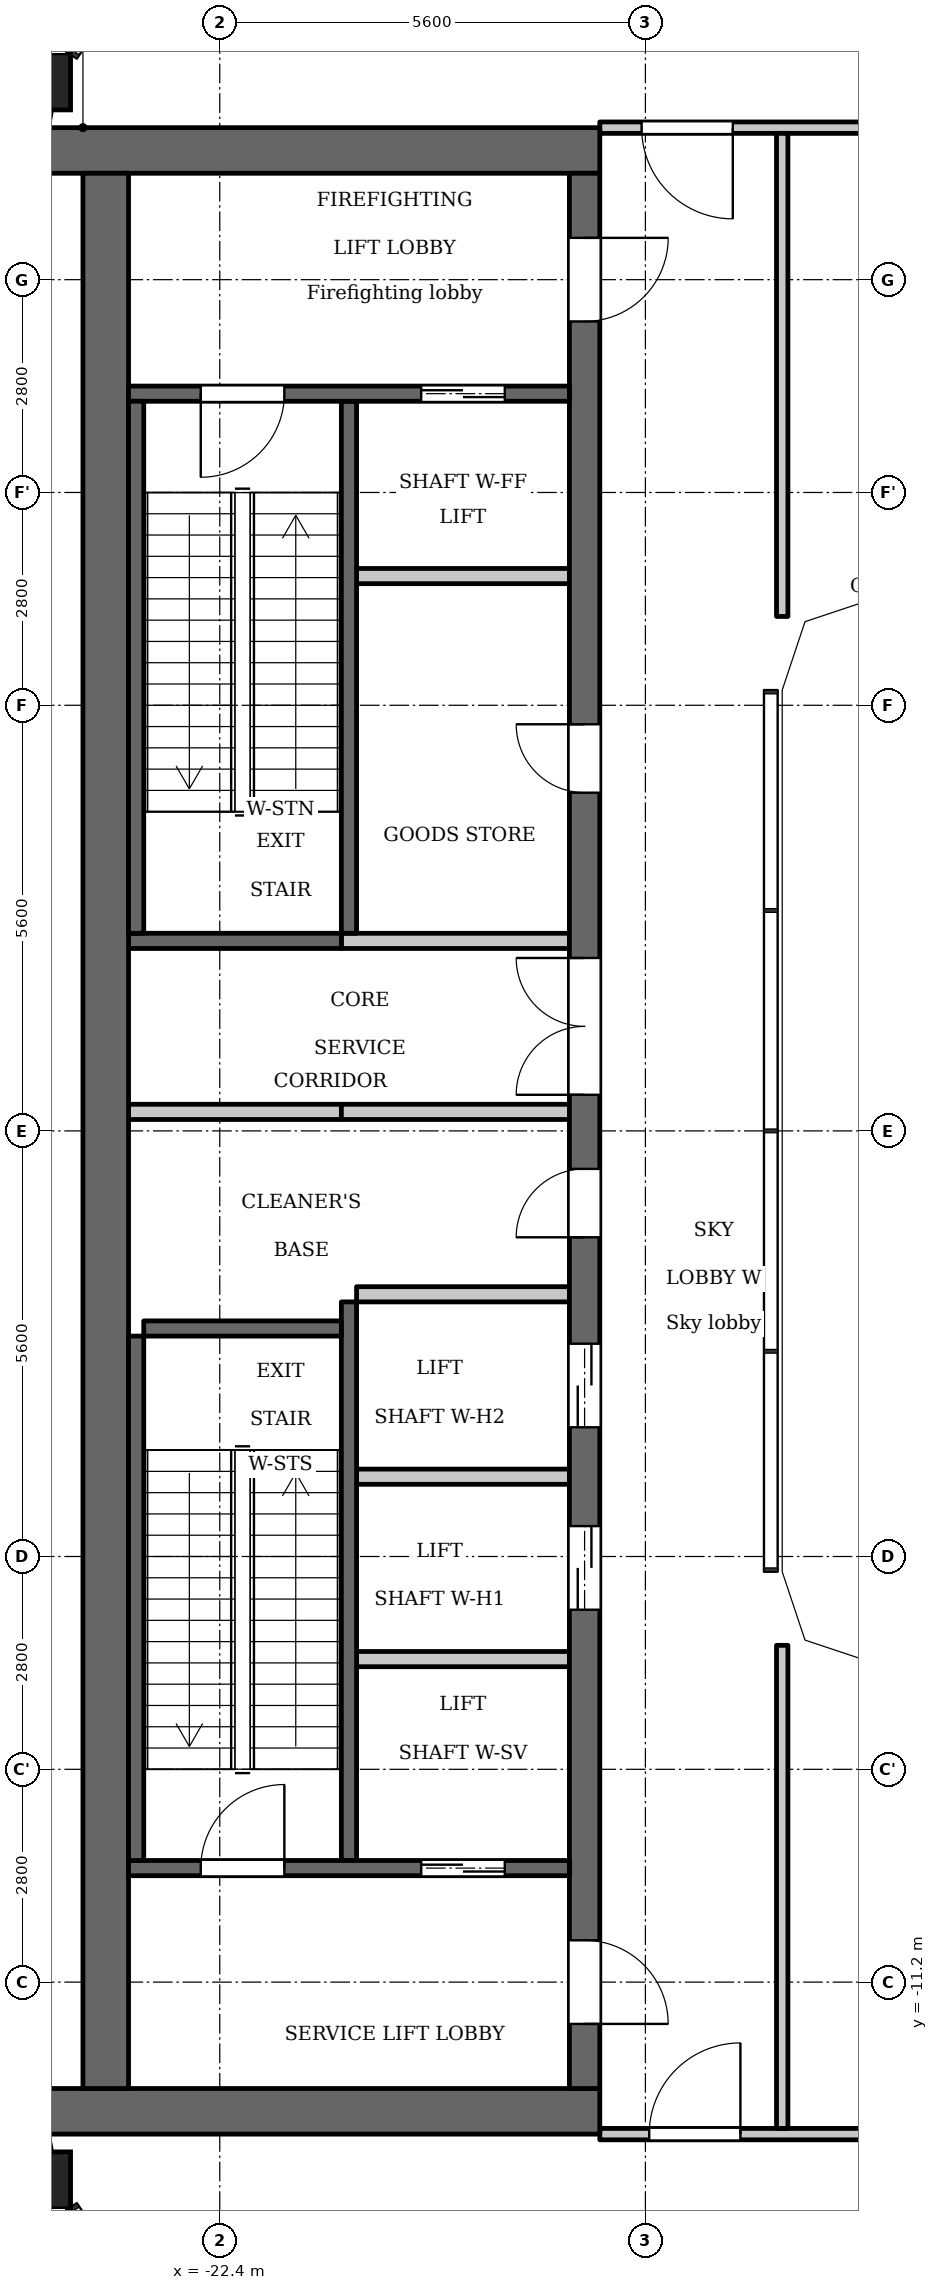
"""IFC4 building model, lengths in metres.
Left out: names, types, materials, properties, quantities, classifications, styles, units other than length and angle.
Written with IfcOpenShell. Run it as: python <this file> out.ifc"""

import sys

from ifc_helpers import new_model, si_unit, direction, frame, frame_2d, origin, origin_2d, place, context, subcontext, project, spatial, polyline, rectangle, outline, extrude, element, fill, save


model = new_model("IFC4")
c1 = context("Model", 3, precision=1e-05, world=origin(), true_north=direction((0.0, 1.0)))
c2 = subcontext(c1, "Body", "Model", "MODEL_VIEW")
j1 = project(units=[si_unit("LENGTHUNIT", "METRE"), si_unit("PLANEANGLEUNIT", "RADIAN")], contexts=[c1])
p1 = place(None, origin())
s1 = spatial("IfcSite", under=j1, at=p1, CompositionType="ELEMENT")
p2 = place(p1, origin())
s2 = spatial("IfcBuilding", under=s1, at=p2, CompositionType="ELEMENT")
p3 = place(p2, frame((0.0, 0.0, 283.7)))
s3 = spatial("IfcBuildingStorey", under=s2, at=p3, CompositionType="ELEMENT", Elevation=283.7)
for number, where, z_axis, x_axis in (
    (1, (-24.738, 13.809, 0.0), (0.0, 0.0, 1.0), (1.0, 0.0, 0.0)),
    (2, (-24.738, -13.809, 0.0), (0.0, 0.0, 1.0), (1.0, 0.0, 0.0)),
):
    element("IfcColumn", number, at=place(p3, frame(where, z_axis=z_axis, x_axis=x_axis)), inside=s3, PredefinedType="COLUMN", context=c2, shape_type="SweptSolid", body=[
        extrude(rectangle(XDim=0.75, YDim=0.75, at=origin_2d()), origin(), (0.0, 0.0, 1.0), 5.4),
    ])
p4 = place(p3, frame((-20.7, 2.6, 0.0), z_axis=(0.0, 0.0, 1.0), x_axis=(0.0, 1.0, 0.0)))
e3 = element("IfcWall", 3, at=p4, inside=s3, PredefinedType="SHEAR", context=c2, shape_type="SweptSolid", body=[
    extrude(rectangle(XDim=7.0, YDim=0.2, at=frame_2d((3.5, 0.0))), origin(), (0.0, 0.0, 1.0), 4.95),
])
p5 = place(p3, frame((-20.7, -9.6, 0.0), z_axis=(0.0, 0.0, 1.0), x_axis=(0.0, 1.0, 0.0)))
e4 = element("IfcWall", 4, at=p5, inside=s3, PredefinedType="SHEAR", context=c2, shape_type="SweptSolid", body=[
    extrude(rectangle(XDim=7.35, YDim=0.2, at=frame_2d((3.675, 0.0))), origin(), (0.0, 0.0, 1.0), 4.95),
])
p6 = place(p3, frame((-20.8, 2.5, 0.0), z_axis=(0.0, 0.0, 1.0), x_axis=(-1.0, 0.0, 0.0)))
e5 = element("IfcWall", 5, at=p6, inside=s3, PredefinedType="SHEAR", context=c2, shape_type="SweptSolid", body=[
    extrude(rectangle(XDim=2.8, YDim=0.2, at=frame_2d((1.4, 0.0))), origin(), (0.0, 0.0, 1.0), 4.95),
])
p7 = place(p3, frame((-20.8, 0.25, 0.0), z_axis=(0.0, 0.0, 1.0), x_axis=(-1.0, 0.0, 0.0)))
e6 = element("IfcWall", 6, at=p7, inside=s3, PredefinedType="PARTITIONING", context=c2, shape_type="SweptSolid", body=[
    extrude(rectangle(XDim=2.8, YDim=0.2, at=frame_2d((1.4, 0.0))), origin(), (0.0, 0.0, 1.0), 4.95),
])
for number, where, z_axis, x_axis in (
    (7, (-17.4, 12.9, 0.0), (0.0, 0.0, 1.0), (-1.0, 0.0, 0.0)),
    (8, (-17.4, -12.9, 0.0), (0.0, 0.0, 1.0), (-1.0, 0.0, 0.0)),
):
    element("IfcWall", number, at=place(p3, frame(where, z_axis=z_axis, x_axis=x_axis)), inside=s3, PredefinedType="SHEAR", context=c2, shape_type="SweptSolid", body=[
        extrude(rectangle(XDim=7.32, YDim=0.6, at=frame_2d((3.66, 0.0))), origin(), (0.0, 0.0, 1.0), 4.95),
    ])
p8 = place(p3, frame((-17.6, -12.6, 0.0), z_axis=(0.0, 0.0, 1.0), x_axis=(0.0, 1.0, 0.0)))
e9 = element("IfcWall", 9, at=p8, inside=s3, PredefinedType="SHEAR", context=c2, shape_type="SweptSolid", body=[
    extrude(rectangle(XDim=25.2, YDim=0.4, at=frame_2d((12.6, 0.0))), origin(), (0.0, 0.0, 1.0), 4.95),
])
p9 = place(p8, frame((6.3, 0.0, 0.0)))
e10 = element("IfcOpeningElement", 10, at=p9, cuts=e9, PredefinedType="OPENING", context=c2, shape_type="SweptSolid", body=[
    extrude(rectangle(XDim=1.1, YDim=2.1, at=frame_2d((0.55, 1.05))), frame((0.0, 0.21, 0.0), z_axis=(0.0, -1.0, 0.0), x_axis=(1.0, 0.0, 0.0)), (0.0, 0.0, 1.0), 0.42),
])
p10 = place(p8, frame((8.7, 0.0, 0.0)))
e11 = element("IfcOpeningElement", 11, at=p10, cuts=e9, PredefinedType="OPENING", context=c2, shape_type="SweptSolid", body=[
    extrude(rectangle(XDim=1.1, YDim=2.1, at=frame_2d((0.55, 1.05))), frame((0.0, 0.21, 0.0), z_axis=(0.0, -1.0, 0.0), x_axis=(1.0, 0.0, 0.0)), (0.0, 0.0, 1.0), 0.42),
])
p11 = place(p8, frame((11.2, 0.0, 0.0)))
e12 = element("IfcOpeningElement", 12, at=p11, cuts=e9, PredefinedType="OPENING", context=c2, shape_type="SweptSolid", body=[
    extrude(rectangle(XDim=0.9, YDim=2.1, at=frame_2d((0.45, 1.05))), frame((0.0, 0.21, 0.0), z_axis=(0.0, -1.0, 0.0), x_axis=(1.0, 0.0, 0.0)), (0.0, 0.0, 1.0), 0.42),
])
p12 = place(p8, frame((17.05, 0.0, 0.0)))
e13 = element("IfcOpeningElement", 13, at=p12, cuts=e9, PredefinedType="OPENING", context=c2, shape_type="SweptSolid", body=[
    extrude(rectangle(XDim=0.9, YDim=2.1, at=frame_2d((0.45, 1.05))), frame((0.0, 0.21, 0.0), z_axis=(0.0, -1.0, 0.0), x_axis=(1.0, 0.0, 0.0)), (0.0, 0.0, 1.0), 0.42),
])
p13 = place(p8, frame((23.25, 0.0, 0.0)))
e14 = element("IfcOpeningElement", 14, at=p13, cuts=e9, PredefinedType="OPENING", context=c2, shape_type="SweptSolid", body=[
    extrude(rectangle(XDim=1.1, YDim=2.1, at=frame_2d((0.55, 1.05))), frame((0.0, 0.21, 0.0), z_axis=(0.0, -1.0, 0.0), x_axis=(1.0, 0.0, 0.0)), (0.0, 0.0, 1.0), 0.42),
])
p14 = place(p8, frame((0.85, 0.0, 0.0)))
e15 = element("IfcOpeningElement", 15, at=p14, cuts=e9, PredefinedType="OPENING", context=c2, shape_type="SweptSolid", body=[
    extrude(rectangle(XDim=1.1, YDim=2.1, at=frame_2d((0.55, 1.05))), frame((0.0, 0.21, 0.0), z_axis=(0.0, -1.0, 0.0), x_axis=(1.0, 0.0, 0.0)), (0.0, 0.0, 1.0), 0.42),
])
p15 = place(p8, frame((13.075, 0.0, 0.0)))
e16 = element("IfcOpeningElement", 16, at=p15, cuts=e9, PredefinedType="OPENING", context=c2, shape_type="SweptSolid", body=[
    extrude(rectangle(XDim=1.8, YDim=2.1, at=frame_2d((0.9, 1.05))), frame((0.0, 0.21, 0.0), z_axis=(0.0, -1.0, 0.0), x_axis=(1.0, 0.0, 0.0)), (0.0, 0.0, 1.0), 0.42),
])
p16 = place(p3, frame((-23.9, -12.6, 0.0), z_axis=(0.0, 0.0, 1.0), x_axis=(0.0, 1.0, 0.0)))
e17 = element("IfcWall", 17, at=p16, inside=s3, PredefinedType="SHEAR", context=c2, shape_type="SweptSolid", body=[
    extrude(rectangle(XDim=25.2, YDim=0.6, at=frame_2d((12.6, 0.0))), origin(), (0.0, 0.0, 1.0), 4.95),
])
p17 = place(p3, frame((-17.8, -9.7, 0.0), z_axis=(0.0, 0.0, 1.0), x_axis=(-1.0, 0.0, 0.0)))
e18 = element("IfcWall", 18, at=p17, inside=s3, PredefinedType="SHEAR", context=c2, shape_type="SweptSolid", body=[
    extrude(rectangle(XDim=5.8, YDim=0.2, at=frame_2d((2.9, 0.0))), origin(), (0.0, 0.0, 1.0), 4.95),
])
p18 = place(p17, frame((0.85, 0.0, 0.0)))
e19 = element("IfcOpeningElement", 19, at=p18, cuts=e18, PredefinedType="OPENING", context=c2, shape_type="SweptSolid", body=[
    extrude(rectangle(XDim=1.1, YDim=2.1, at=frame_2d((0.55, 1.05))), frame((0.0, 0.11, 0.0), z_axis=(0.0, -1.0, 0.0), x_axis=(1.0, 0.0, 0.0)), (0.0, 0.0, 1.0), 0.22),
])
p19 = place(p17, frame((3.75, 0.0, 0.0)))
e20 = element("IfcOpeningElement", 20, at=p19, cuts=e18, PredefinedType="OPENING", context=c2, shape_type="SweptSolid", body=[
    extrude(rectangle(XDim=1.1, YDim=2.1, at=frame_2d((0.55, 1.05))), frame((0.0, 0.11, 0.0), z_axis=(0.0, -1.0, 0.0), x_axis=(1.0, 0.0, 0.0)), (0.0, 0.0, 1.0), 0.22),
])
for number, where, z_axis, x_axis in (
    (21, (-17.8, -6.95, 0.0), (0.0, 0.0, 1.0), (-1.0, 0.0, 0.0)),
    (22, (-17.8, -4.55, 0.0), (0.0, 0.0, 1.0), (-1.0, 0.0, 0.0)),
    (23, (-17.8, -2.15, 0.0), (0.0, 0.0, 1.0), (-1.0, 0.0, 0.0)),
):
    element("IfcWall", number, at=place(p3, frame(where, z_axis=z_axis, x_axis=x_axis)), inside=s3, PredefinedType="PARTITIONING", context=c2, shape_type="SweptSolid", body=[
        extrude(rectangle(XDim=2.8, YDim=0.2, at=frame_2d((1.4, 0.0))), origin(), (0.0, 0.0, 1.0), 4.95),
    ])
for number, where, z_axis, x_axis in (
    (24, (-17.8, 0.25, 0.0), (0.0, 0.0, 1.0), (-1.0, 0.0, 0.0)),
    (25, (-17.8, 2.5, 0.0), (0.0, 0.0, 1.0), (-1.0, 0.0, 0.0)),
):
    element("IfcWall", number, at=place(p3, frame(where, z_axis=z_axis, x_axis=x_axis)), inside=s3, PredefinedType="PARTITIONING", context=c2, shape_type="SweptSolid", body=[
        extrude(rectangle(XDim=3.0, YDim=0.2, at=frame_2d((1.5, 0.0))), origin(), (0.0, 0.0, 1.0), 4.95),
    ])
p20 = place(p3, frame((-17.8, 7.3, 0.0), z_axis=(0.0, 0.0, 1.0), x_axis=(-1.0, 0.0, 0.0)))
e26 = element("IfcWall", 26, at=p20, inside=s3, PredefinedType="PARTITIONING", context=c2, shape_type="SweptSolid", body=[
    extrude(rectangle(XDim=2.8, YDim=0.2, at=frame_2d((1.4, 0.0))), origin(), (0.0, 0.0, 1.0), 4.95),
])
p21 = place(p3, frame((-17.8, 9.7, 0.0), z_axis=(0.0, 0.0, 1.0), x_axis=(-1.0, 0.0, 0.0)))
e27 = element("IfcWall", 27, at=p21, inside=s3, PredefinedType="SHEAR", context=c2, shape_type="SweptSolid", body=[
    extrude(rectangle(XDim=5.8, YDim=0.2, at=frame_2d((2.9, 0.0))), origin(), (0.0, 0.0, 1.0), 4.95),
])
p22 = place(p21, frame((0.85, 0.0, 0.0)))
e28 = element("IfcOpeningElement", 28, at=p22, cuts=e27, PredefinedType="OPENING", context=c2, shape_type="SweptSolid", body=[
    extrude(rectangle(XDim=1.1, YDim=2.1, at=frame_2d((0.55, 1.05))), frame((0.0, 0.11, 0.0), z_axis=(0.0, -1.0, 0.0), x_axis=(1.0, 0.0, 0.0)), (0.0, 0.0, 1.0), 0.22),
])
p23 = place(p21, frame((3.75, 0.0, 0.0)))
e29 = element("IfcOpeningElement", 29, at=p23, cuts=e27, PredefinedType="OPENING", context=c2, shape_type="SweptSolid", body=[
    extrude(rectangle(XDim=1.1, YDim=2.1, at=frame_2d((0.55, 1.05))), frame((0.0, 0.11, 0.0), z_axis=(0.0, -1.0, 0.0), x_axis=(1.0, 0.0, 0.0)), (0.0, 0.0, 1.0), 0.22),
])
p24 = place(p3, frame((-23.5, 2.6, 0.0), z_axis=(0.0, 0.0, 1.0), x_axis=(0.0, 1.0, 0.0)))
e30 = element("IfcWall", 30, at=p24, inside=s3, PredefinedType="SHEAR", context=c2, shape_type="SweptSolid", body=[
    extrude(rectangle(XDim=7.0, YDim=0.2, at=frame_2d((3.5, 0.0))), origin(), (0.0, 0.0, 1.0), 4.95),
])
p25 = place(p3, frame((-23.5, -9.6, 0.0), z_axis=(0.0, 0.0, 1.0), x_axis=(0.0, 1.0, 0.0)))
e31 = element("IfcWall", 31, at=p25, inside=s3, PredefinedType="SHEAR", context=c2, shape_type="SweptSolid", body=[
    extrude(rectangle(XDim=6.9, YDim=0.2, at=frame_2d((3.45, 0.0))), origin(), (0.0, 0.0, 1.0), 4.95),
])
p26 = place(p3, frame((-20.8, -2.6, 0.0), z_axis=(0.0, 0.0, 1.0), x_axis=(-1.0, 0.0, 0.0)))
e32 = element("IfcWall", 32, at=p26, inside=s3, PredefinedType="SHEAR", context=c2, shape_type="SweptSolid", body=[
    extrude(rectangle(XDim=2.6, YDim=0.2, at=frame_2d((1.3, 0.0))), origin(), (0.0, 0.0, 1.0), 4.95),
])
p27 = place(p3, frame((-17.4, -13.2, 0.0), z_axis=(0.0, 0.0, 1.0), x_axis=(1.0, 0.0, 0.0)))
e33 = element("IfcWall", 33, at=p27, inside=s3, PredefinedType="PARTITIONING", context=c2, shape_type="SweptSolid", body=[
    extrude(rectangle(XDim=34.8, YDim=0.15, at=frame_2d((17.4, 0.0))), origin(), (0.0, 0.0, 1.0), 4.95),
])
p28 = place(p27, frame((0.65, 0.0, 0.0)))
e34 = element("IfcOpeningElement", 34, at=p28, cuts=e33, PredefinedType="OPENING", context=c2, shape_type="SweptSolid", body=[
    extrude(rectangle(XDim=1.2, YDim=2.1, at=frame_2d((0.6, 1.05))), frame((0.0, 0.085, 0.0), z_axis=(0.0, -1.0, 0.0), x_axis=(1.0, 0.0, 0.0)), (0.0, 0.0, 1.0), 0.17),
])
p29 = place(p27, frame((14.75, 0.0, 0.0)))
e35 = element("IfcOpeningElement", 35, at=p29, cuts=e33, PredefinedType="OPENING", context=c2, shape_type="SweptSolid", body=[
    extrude(rectangle(XDim=1.0, YDim=2.1, at=frame_2d((0.5, 1.05))), frame((0.0, 0.085, 0.0), z_axis=(0.0, -1.0, 0.0), x_axis=(1.0, 0.0, 0.0)), (0.0, 0.0, 1.0), 0.17),
])
p30 = place(p27, frame((17.0, 0.0, 0.0)))
e36 = element("IfcOpeningElement", 36, at=p30, cuts=e33, PredefinedType="OPENING", context=c2, shape_type="SweptSolid", body=[
    extrude(rectangle(XDim=1.0, YDim=2.1, at=frame_2d((0.5, 1.05))), frame((0.0, 0.085, 0.0), z_axis=(0.0, -1.0, 0.0), x_axis=(1.0, 0.0, 0.0)), (0.0, 0.0, 1.0), 0.17),
])
p31 = place(p27, frame((30.75, 0.0, 0.0)))
e37 = element("IfcOpeningElement", 37, at=p31, cuts=e33, PredefinedType="OPENING", context=c2, shape_type="SweptSolid", body=[
    extrude(rectangle(XDim=1.0, YDim=2.1, at=frame_2d((0.5, 1.05))), frame((0.0, 0.085, 0.0), z_axis=(0.0, -1.0, 0.0), x_axis=(1.0, 0.0, 0.0)), (0.0, 0.0, 1.0), 0.17),
])
p32 = place(p3, frame((-17.4, 13.2, 0.0), z_axis=(0.0, 0.0, 1.0), x_axis=(1.0, 0.0, 0.0)))
e38 = element("IfcWall", 38, at=p32, inside=s3, PredefinedType="PARTITIONING", context=c2, shape_type="SweptSolid", body=[
    extrude(rectangle(XDim=34.8, YDim=0.15, at=frame_2d((17.4, 0.0))), origin(), (0.0, 0.0, 1.0), 4.95),
])
p33 = place(p32, frame((0.55, 0.0, 0.0)))
e39 = element("IfcOpeningElement", 39, at=p33, cuts=e38, PredefinedType="OPENING", context=c2, shape_type="SweptSolid", body=[
    extrude(rectangle(XDim=1.2, YDim=2.1, at=frame_2d((0.6, 1.05))), frame((0.0, 0.085, 0.0), z_axis=(0.0, -1.0, 0.0), x_axis=(1.0, 0.0, 0.0)), (0.0, 0.0, 1.0), 0.17),
])
p34 = place(p32, frame((30.05, 0.0, 0.0)))
e40 = element("IfcOpeningElement", 40, at=p34, cuts=e38, PredefinedType="OPENING", context=c2, shape_type="SweptSolid", body=[
    extrude(rectangle(XDim=1.8, YDim=2.1, at=frame_2d((0.9, 1.05))), frame((0.0, 0.085, 0.0), z_axis=(0.0, -1.0, 0.0), x_axis=(1.0, 0.0, 0.0)), (0.0, 0.0, 1.0), 0.17),
])
for number, where, z_axis, x_axis in (
    (41, (-15.0, -13.125, 0.0), (0.0, 0.0, 1.0), (0.0, 1.0, 0.0)),
    (42, (-15.0, 6.769, 0.0), (0.0, 0.0, 1.0), (0.0, 1.0, 0.0)),
):
    element("IfcWall", number, at=place(p3, frame(where, z_axis=z_axis, x_axis=x_axis)), inside=s3, PredefinedType="PARTITIONING", context=c2, shape_type="SweptSolid", body=[
        extrude(rectangle(XDim=6.356, YDim=0.15, at=frame_2d((3.178, 0.0))), origin(), (0.0, 0.0, 1.0), 4.95),
    ])
p35 = place(p3, origin())
e43 = element("IfcWall", 43, at=p35, inside=s3, PredefinedType="SOLIDWALL", context=c2, shape_type="SweptSolid", body=[
    extrude(outline(polyline([(-13.849, 7.3), (-14.937, 6.937), (-15.3, 5.849), (-15.3, 5.8), (-15.0, 5.8), (-14.7, 6.7), (-13.8, 7.0), (-13.8, 7.3), (-13.849, 7.3)])), origin(), (0.0, 0.0, 1.0), 4.95),
])
e44 = element("IfcWall", 44, at=p35, inside=s3, PredefinedType="SOLIDWALL", context=c2, shape_type="SweptSolid", body=[
    extrude(outline(polyline([(-14.937, -6.937), (-13.849, -7.3), (-13.8, -7.3), (-13.8, -7.0), (-14.7, -6.7), (-15.0, -5.8), (-15.3, -5.8), (-15.3, -5.849), (-14.937, -6.937)])), origin(), (0.0, 0.0, 1.0), 4.95),
])
p36 = place(p18, origin())
e45 = element("IfcDoor", 45, at=p36, inside=s3, OperationType="DOUBLE_DOOR_SLIDING", PredefinedType="DOOR", context=c2, shape_type="SweptSolid", body=[
    extrude(rectangle(XDim=1.1, YDim=2.1, at=frame_2d((0.55, 1.05))), frame((0.0, 0.025, 0.0), z_axis=(0.0, -1.0, 0.0), x_axis=(1.0, 0.0, 0.0)), (0.0, 0.0, 1.0), 0.05),
])
fill(e19, e45)
p37 = place(p9, origin())
e46 = element("IfcDoor", 46, at=p37, inside=s3, OperationType="DOUBLE_DOOR_SLIDING", PredefinedType="DOOR", context=c2, shape_type="SweptSolid", body=[
    extrude(rectangle(XDim=1.1, YDim=2.1, at=frame_2d((0.55, 1.05))), frame((0.0, 0.025, 0.0), z_axis=(0.0, -1.0, 0.0), x_axis=(1.0, 0.0, 0.0)), (0.0, 0.0, 1.0), 0.05),
])
fill(e10, e46)
p38 = place(p10, origin())
e47 = element("IfcDoor", 47, at=p38, inside=s3, OperationType="DOUBLE_DOOR_SLIDING", PredefinedType="DOOR", context=c2, shape_type="SweptSolid", body=[
    extrude(rectangle(XDim=1.1, YDim=2.1, at=frame_2d((0.55, 1.05))), frame((0.0, 0.025, 0.0), z_axis=(0.0, -1.0, 0.0), x_axis=(1.0, 0.0, 0.0)), (0.0, 0.0, 1.0), 0.05),
])
fill(e11, e47)
p39 = place(p11, origin())
e48 = element("IfcDoor", 48, at=p39, inside=s3, OperationType="SINGLE_SWING_RIGHT", PredefinedType="DOOR", context=c2, shape_type="SweptSolid", body=[
    extrude(rectangle(XDim=0.9, YDim=2.1, at=frame_2d((0.45, 1.05))), frame((0.0, 0.025, 0.0), z_axis=(0.0, -1.0, 0.0), x_axis=(1.0, 0.0, 0.0)), (0.0, 0.0, 1.0), 0.05),
])
fill(e12, e48)
p40 = place(p12, origin())
e49 = element("IfcDoor", 49, at=p40, inside=s3, OperationType="SINGLE_SWING_LEFT", PredefinedType="DOOR", context=c2, shape_type="SweptSolid", body=[
    extrude(rectangle(XDim=0.9, YDim=2.1, at=frame_2d((0.45, 1.05))), frame((0.0, 0.025, 0.0), z_axis=(0.0, -1.0, 0.0), x_axis=(1.0, 0.0, 0.0)), (0.0, 0.0, 1.0), 0.05),
])
fill(e13, e49)
p41 = place(p22, origin())
e50 = element("IfcDoor", 50, at=p41, inside=s3, OperationType="DOUBLE_DOOR_SLIDING", PredefinedType="DOOR", context=c2, shape_type="SweptSolid", body=[
    extrude(rectangle(XDim=1.1, YDim=2.1, at=frame_2d((0.55, 1.05))), frame((0.0, 0.025, 0.0), z_axis=(0.0, -1.0, 0.0), x_axis=(1.0, 0.0, 0.0)), (0.0, 0.0, 1.0), 0.05),
])
fill(e28, e50)
p42 = place(p13, origin())
e51 = element("IfcDoor", 51, at=p42, inside=s3, OperationType="SINGLE_SWING_RIGHT", PredefinedType="DOOR", context=c2, shape_type="SweptSolid", body=[
    extrude(rectangle(XDim=1.1, YDim=2.1, at=frame_2d((0.55, 1.05))), frame((0.0, 0.025, 0.0), z_axis=(0.0, -1.0, 0.0), x_axis=(1.0, 0.0, 0.0)), (0.0, 0.0, 1.0), 0.05),
])
fill(e14, e51)
p43 = place(p14, origin())
e52 = element("IfcDoor", 52, at=p43, inside=s3, OperationType="SINGLE_SWING_LEFT", PredefinedType="DOOR", context=c2, shape_type="SweptSolid", body=[
    extrude(rectangle(XDim=1.1, YDim=2.1, at=frame_2d((0.55, 1.05))), frame((0.0, 0.025, 0.0), z_axis=(0.0, -1.0, 0.0), x_axis=(1.0, 0.0, 0.0)), (0.0, 0.0, 1.0), 0.05),
])
fill(e15, e52)
p44 = place(p23, origin())
e53 = element("IfcDoor", 53, at=p44, inside=s3, OperationType="SINGLE_SWING_LEFT", PredefinedType="DOOR", context=c2, shape_type="SweptSolid", body=[
    extrude(rectangle(XDim=1.1, YDim=2.1, at=frame_2d((0.55, 1.05))), frame((0.0, 0.025, 0.0), z_axis=(0.0, -1.0, 0.0), x_axis=(1.0, 0.0, 0.0)), (0.0, 0.0, 1.0), 0.05),
])
fill(e29, e53)
p45 = place(p19, origin())
e54 = element("IfcDoor", 54, at=p45, inside=s3, OperationType="SINGLE_SWING_LEFT", PredefinedType="DOOR", context=c2, shape_type="SweptSolid", body=[
    extrude(rectangle(XDim=1.1, YDim=2.1, at=frame_2d((0.55, 1.05))), frame((0.0, 0.025, 0.0), z_axis=(0.0, -1.0, 0.0), x_axis=(1.0, 0.0, 0.0)), (0.0, 0.0, 1.0), 0.05),
])
fill(e20, e54)
p46 = place(p15, origin())
e55 = element("IfcDoor", 55, at=p46, inside=s3, OperationType="DOUBLE_DOOR_SINGLE_SWING", PredefinedType="DOOR", context=c2, shape_type="SweptSolid", body=[
    extrude(rectangle(XDim=1.8, YDim=2.1, at=frame_2d((0.9, 1.05))), frame((0.0, 0.025, 0.0), z_axis=(0.0, -1.0, 0.0), x_axis=(1.0, 0.0, 0.0)), (0.0, 0.0, 1.0), 0.05),
])
fill(e16, e55)
p47 = place(p33, origin())
e56 = element("IfcDoor", 56, at=p47, inside=s3, OperationType="SINGLE_SWING_RIGHT", PredefinedType="DOOR", context=c2, shape_type="SweptSolid", body=[
    extrude(rectangle(XDim=1.2, YDim=2.1, at=frame_2d((0.6, 1.05))), frame((0.0, 0.025, 0.0), z_axis=(0.0, -1.0, 0.0), x_axis=(1.0, 0.0, 0.0)), (0.0, 0.0, 1.0), 0.05),
])
fill(e39, e56)
p48 = place(p28, origin())
e57 = element("IfcDoor", 57, at=p48, inside=s3, OperationType="SINGLE_SWING_LEFT", PredefinedType="DOOR", context=c2, shape_type="SweptSolid", body=[
    extrude(rectangle(XDim=1.2, YDim=2.1, at=frame_2d((0.6, 1.05))), frame((0.0, 0.025, 0.0), z_axis=(0.0, -1.0, 0.0), x_axis=(1.0, 0.0, 0.0)), (0.0, 0.0, 1.0), 0.05),
])
fill(e34, e57)
save(model, sys.argv[1])
